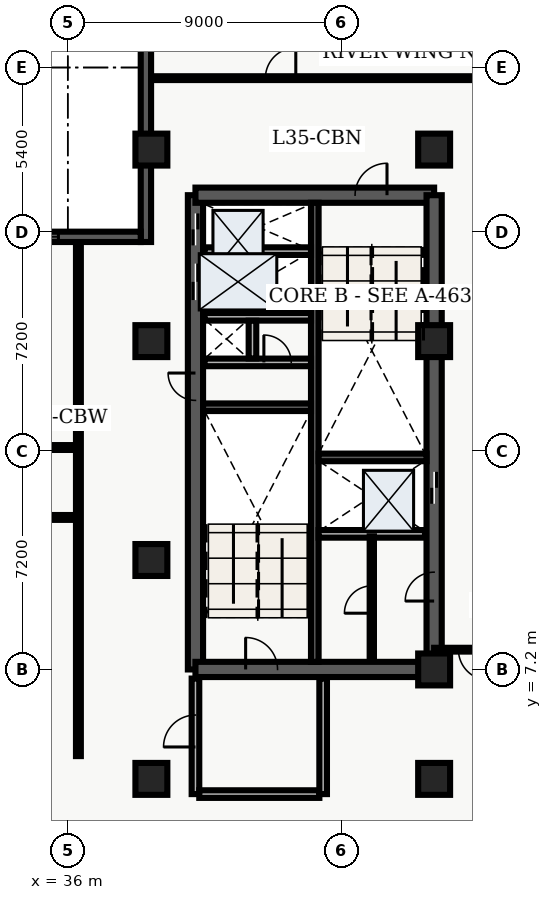
"""IFC4 building model, lengths in metres.
Left out: names, types, materials, properties, quantities, classifications, styles, units other than length and angle.
Written with IfcOpenShell. Run it as: python <this file> out.ifc"""

import sys

from ifc_helpers import new_model, entity, si_unit, converted_unit, direction, frame, origin_with_axes, origin_2d_with_axis, place, context, subcontext, project, spatial, polyline, rectangle, outline, extrude, element, fill, save


model = new_model("IFC4")
c1 = context("Model", 3, precision=1e-05, world=origin_with_axes(), true_north=direction((0.0, 1.0)))
c2 = subcontext(c1, "Body", "Model", "MODEL_VIEW")
j1 = project(units=[si_unit("LENGTHUNIT", "METRE"), converted_unit("PLANEANGLEUNIT", "DEGREE", entity("IfcPlaneAngleMeasure", 0.017), si_unit("PLANEANGLEUNIT", "RADIAN"), dimensions=[0, 0, 0, 0, 0, 0, 0])], contexts=[c1])
p1 = place(None, origin_with_axes())
s1 = spatial("IfcSite", under=j1, at=p1, CompositionType="ELEMENT")
p2 = place(p1, origin_with_axes())
s2 = spatial("IfcBuilding", under=s1, at=p2, CompositionType="ELEMENT")
p3 = place(p2, frame((0.0, 0.0, 144.6), z_axis=(0.0, 0.0, 1.0), x_axis=(1.0, 0.0, 0.0)))
s3 = spatial("IfcBuildingStorey", under=s2, at=p3, CompositionType="ELEMENT", Elevation=144.6)
p4 = place(p3, frame((40.2, 7.2, 0.0), z_axis=(0.0, 0.0, 1.0), x_axis=(0.0, 1.0, 0.0)))
e1 = element("IfcWall", 1, at=p4, inside=s3, PredefinedType="SHEAR", context=c2, shape_type="SweptSolid", body=[
    extrude(outline(polyline([(0.0, -0.25), (15.6, -0.25), (15.6, 0.25), (0.0, 0.25), (0.0, -0.25)])), origin_with_axes(), (0.0, 0.0, 1.0), 3.66),
])
p5 = place(p4, frame((14.475, 0.0, 0.0), z_axis=(0.0, 0.0, 1.0), x_axis=(1.0, 0.0, 0.0)))
e2 = element("IfcOpeningElement", 2, at=p5, cuts=e1, PredefinedType="OPENING", context=c2, shape_type="SweptSolid", body=[
    extrude(rectangle(XDim=1.05, YDim=0.52, at=origin_2d_with_axis()), origin_with_axes(), (0.0, 0.0, 1.0), 2.15),
])
p6 = place(p4, frame((12.75, 0.0, 0.0), z_axis=(0.0, 0.0, 1.0), x_axis=(1.0, 0.0, 0.0)))
e3 = element("IfcOpeningElement", 3, at=p6, cuts=e1, PredefinedType="OPENING", context=c2, shape_type="SweptSolid", body=[
    extrude(rectangle(XDim=1.2, YDim=0.52, at=origin_2d_with_axis()), origin_with_axes(), (0.0, 0.0, 1.0), 2.15),
])
p7 = place(p4, frame((9.3, 0.0, 0.0), z_axis=(0.0, 0.0, 1.0), x_axis=(1.0, 0.0, 0.0)))
e4 = element("IfcOpeningElement", 4, at=p7, cuts=e1, PredefinedType="OPENING", context=c2, shape_type="SweptSolid", body=[
    extrude(rectangle(XDim=0.9, YDim=0.52, at=origin_2d_with_axis()), origin_with_axes(), (0.0, 0.0, 1.0), 2.15),
])
p8 = place(p3, frame((40.2, 7.2, 0.0), z_axis=(0.0, 0.0, 1.0), x_axis=(1.0, 0.0, 0.0)))
e5 = element("IfcWall", 5, at=p8, inside=s3, PredefinedType="SHEAR", context=c2, shape_type="SweptSolid", body=[
    extrude(outline(polyline([(0.0, -0.25), (7.85, -0.25), (7.85, 0.25), (0.0, 0.25), (0.0, -0.25)])), origin_with_axes(), (0.0, 0.0, 1.0), 3.66),
])
p9 = place(p8, frame((2.175, 0.0, 0.0), z_axis=(0.0, 0.0, 1.0), x_axis=(1.0, 0.0, 0.0)))
e6 = element("IfcOpeningElement", 6, at=p9, cuts=e5, PredefinedType="OPENING", context=c2, shape_type="SweptSolid", body=[
    extrude(rectangle(XDim=1.05, YDim=0.52, at=origin_2d_with_axis()), origin_with_axes(), (0.0, 0.0, 1.0), 2.15),
])
p10 = place(p3, frame((40.2, 22.8, 0.0), z_axis=(0.0, 0.0, 1.0), x_axis=(1.0, 0.0, 0.0)))
e7 = element("IfcWall", 7, at=p10, inside=s3, PredefinedType="SHEAR", context=c2, shape_type="SweptSolid", body=[
    extrude(outline(polyline([(0.0, -0.25), (7.85, -0.25), (7.85, 0.25), (0.0, 0.25), (0.0, -0.25)])), origin_with_axes(), (0.0, 0.0, 1.0), 3.66),
])
p11 = place(p10, frame((5.775, 0.0, 0.0), z_axis=(0.0, 0.0, 1.0), x_axis=(1.0, 0.0, 0.0)))
e8 = element("IfcOpeningElement", 8, at=p11, cuts=e7, PredefinedType="OPENING", context=c2, shape_type="SweptSolid", body=[
    extrude(rectangle(XDim=1.05, YDim=0.52, at=origin_2d_with_axis()), origin_with_axes(), (0.0, 0.0, 1.0), 2.15),
])
p12 = place(p3, frame((48.05, 7.2, 0.0), z_axis=(0.0, 0.0, 1.0), x_axis=(0.0, 1.0, 0.0)))
e9 = element("IfcWall", 9, at=p12, inside=s3, PredefinedType="SHEAR", context=c2, shape_type="SweptSolid", body=[
    extrude(outline(polyline([(0.0, -0.25), (15.6, -0.25), (15.6, 0.25), (0.0, 0.25), (0.0, -0.25)])), origin_with_axes(), (0.0, 0.0, 1.0), 3.66),
])
p13 = place(p12, frame((5.975, 0.0, 0.0), z_axis=(0.0, 0.0, 1.0), x_axis=(1.0, 0.0, 0.0)))
e10 = element("IfcOpeningElement", 10, at=p13, cuts=e9, PredefinedType="OPENING", context=c2, shape_type="SweptSolid", body=[
    extrude(rectangle(XDim=1.05, YDim=0.52, at=origin_2d_with_axis()), origin_with_axes(), (0.0, 0.0, 1.0), 2.15),
])
p14 = place(p12, frame((2.725, 0.0, 0.0), z_axis=(0.0, 0.0, 1.0), x_axis=(1.0, 0.0, 0.0)))
e11 = element("IfcOpeningElement", 11, at=p14, cuts=e9, PredefinedType="OPENING", context=c2, shape_type="SweptSolid", body=[
    extrude(rectangle(XDim=0.95, YDim=0.52, at=origin_2d_with_axis()), origin_with_axes(), (0.0, 0.0, 1.0), 2.15),
])
p15 = place(p3, frame((44.125, 7.45, 0.0), z_axis=(0.0, 0.0, 1.0), x_axis=(0.0, 1.0, 0.0)))
e12 = element("IfcWall", 12, at=p15, inside=s3, PredefinedType="SHEAR", context=c2, shape_type="SweptSolid", body=[
    extrude(outline(polyline([(0.0, -0.125), (15.1, -0.125), (15.1, 0.125), (0.0, 0.125), (0.0, -0.125)])), origin_with_axes(), (0.0, 0.0, 1.0), 3.66),
])
for number, where, z_axis, x_axis in (
    (13, (40.45, 15.825, 0.0), (0.0, 0.0, 1.0), (1.0, 0.0, 0.0)),
    (14, (44.25, 14.175, 0.0), (0.0, 0.0, 1.0), (1.0, 0.0, 0.0)),
):
    element("IfcWall", number, at=place(p3, frame(where, z_axis=z_axis, x_axis=x_axis)), inside=s3, PredefinedType="SHEAR", context=c2, shape_type="SweptSolid", body=[
        extrude(outline(polyline([(0.0, -0.125), (3.55, -0.125), (3.55, 0.125), (0.0, 0.125), (0.0, -0.125)])), origin_with_axes(), (0.0, 0.0, 1.0), 3.66),
    ])
p16 = place(p3, frame((40.5, 17.3, 0.0), z_axis=(0.0, 0.0, 1.0), x_axis=(1.0, 0.0, 0.0)))
e15 = element("IfcWall", 15, at=p16, inside=s3, PredefinedType="SOLIDWALL", context=c2, shape_type="SweptSolid", body=[
    extrude(outline(polyline([(0.0, -0.125), (3.5, -0.125), (3.5, 0.125), (0.0, 0.125), (0.0, -0.125)])), origin_with_axes(), (0.0, 0.0, 1.0), 2.7),
])
p17 = place(p16, frame((2.4, 0.0, 0.0), z_axis=(0.0, 0.0, 1.0), x_axis=(1.0, 0.0, 0.0)))
e16 = element("IfcOpeningElement", 16, at=p17, cuts=e15, PredefinedType="OPENING", context=c2, shape_type="SweptSolid", body=[
    extrude(rectangle(XDim=0.9, YDim=0.27, at=origin_2d_with_axis()), origin_with_axes(), (0.0, 0.0, 1.0), 2.15),
])
p18 = place(p3, frame((40.5, 18.8, 0.0), z_axis=(0.0, 0.0, 1.0), x_axis=(1.0, 0.0, 0.0)))
e17 = element("IfcWall", 17, at=p18, inside=s3, PredefinedType="SOLIDWALL", context=c2, shape_type="SweptSolid", body=[
    extrude(outline(polyline([(0.0, -0.125), (3.5, -0.125), (3.5, 0.125), (0.0, 0.125), (0.0, -0.125)])), origin_with_axes(), (0.0, 0.0, 1.0), 2.7),
])
p19 = place(p3, frame((42.075, 17.43, 0.0), z_axis=(0.0, 0.0, 1.0), x_axis=(0.0, 1.0, 0.0)))
e18 = element("IfcWall", 18, at=p19, inside=s3, PredefinedType="SOLIDWALL", context=c2, shape_type="SweptSolid", body=[
    extrude(outline(polyline([(0.0, -0.125), (1.24, -0.125), (1.24, 0.125), (0.0, 0.125), (0.0, -0.125)])), origin_with_axes(), (0.0, 0.0, 1.0), 2.7),
])
p20 = place(p3, frame((40.2, 3.1, 0.0), z_axis=(0.0, 0.0, 1.0), x_axis=(0.0, 1.0, 0.0)))
e19 = element("IfcWall", 19, at=p20, inside=s3, PredefinedType="SOLIDWALL", context=c2, shape_type="SweptSolid", body=[
    extrude(outline(polyline([(0.0, -0.125), (3.8, -0.125), (3.8, 0.125), (0.0, 0.125), (0.0, -0.125)])), origin_with_axes(), (0.0, 0.0, 1.0), 2.7),
])
p21 = place(p20, frame((2.075, 0.0, 0.0), z_axis=(0.0, 0.0, 1.0), x_axis=(1.0, 0.0, 0.0)))
e20 = element("IfcOpeningElement", 20, at=p21, cuts=e19, PredefinedType="OPENING", context=c2, shape_type="SweptSolid", body=[
    extrude(rectangle(XDim=1.05, YDim=0.27, at=origin_2d_with_axis()), origin_with_axes(), (0.0, 0.0, 1.0), 2.15),
])
p22 = place(p3, frame((40.325, 3.1, 0.0), z_axis=(0.0, 0.0, 1.0), x_axis=(1.0, 0.0, 0.0)))
e21 = element("IfcWall", 21, at=p22, inside=s3, PredefinedType="SOLIDWALL", context=c2, shape_type="SweptSolid", body=[
    extrude(outline(polyline([(0.0, -0.125), (3.95, -0.125), (3.95, 0.125), (0.0, 0.125), (0.0, -0.125)])), origin_with_axes(), (0.0, 0.0, 1.0), 2.7),
])
p23 = place(p3, frame((44.4, 3.1, 0.0), z_axis=(0.0, 0.0, 1.0), x_axis=(0.0, 1.0, 0.0)))
e22 = element("IfcWall", 22, at=p23, inside=s3, PredefinedType="SOLIDWALL", context=c2, shape_type="SweptSolid", body=[
    extrude(outline(polyline([(0.0, -0.125), (3.8, -0.125), (3.8, 0.125), (0.0, 0.125), (0.0, -0.125)])), origin_with_axes(), (0.0, 0.0, 1.0), 2.7),
])
for number, where, z_axis, x_axis in (
    (23, (38.75, 3.6, 0.0), (0.0, 0.0, 1.0), (1.0, 0.0, 0.0)),
    (24, (38.75, 10.8, 0.0), (0.0, 0.0, 1.0), (1.0, 0.0, 0.0)),
    (25, (38.75, 18.0, 0.0), (0.0, 0.0, 1.0), (1.0, 0.0, 0.0)),
    (26, (38.75, 24.3, 0.0), (0.0, 0.0, 1.0), (1.0, 0.0, 0.0)),
    (27, (48.05, 3.6, 0.0), (0.0, 0.0, 1.0), (1.0, 0.0, 0.0)),
    (28, (48.05, 7.2, 0.0), (0.0, 0.0, 1.0), (1.0, 0.0, 0.0)),
    (29, (48.05, 18.0, 0.0), (0.0, 0.0, 1.0), (1.0, 0.0, 0.0)),
    (30, (48.05, 24.3, 0.0), (0.0, 0.0, 1.0), (1.0, 0.0, 0.0)),
):
    element("IfcColumn", number, at=place(p3, frame(where, z_axis=z_axis, x_axis=x_axis)), inside=s3, PredefinedType="COLUMN", context=c2, shape_type="SweptSolid", body=[
        extrude(rectangle(XDim=1.05, YDim=1.05, at=origin_2d_with_axis()), origin_with_axes(), (0.0, 0.0, 1.0), 3.9),
    ])
for number, where, z_axis, x_axis in (
    (31, (40.5, 20.96, 0.0), (0.0, 0.0, 1.0), (1.0, 0.0, 0.0)),
    (32, (44.25, 11.66, 0.0), (0.0, 0.0, 1.0), (1.0, 0.0, 0.0)),
):
    element("IfcWall", number, at=place(p3, frame(where, z_axis=z_axis, x_axis=x_axis)), inside=s3, PredefinedType="SOLIDWALL", context=c2, shape_type="SweptSolid", body=[
        extrude(outline(polyline([(0.0, -0.125), (3.5, -0.125), (3.5, 0.125), (0.0, 0.125), (0.0, -0.125)])), origin_with_axes(), (0.0, 0.0, 1.0), 2.7),
    ])
p24 = place(p3, frame((46.0, 7.5, 0.0), z_axis=(0.0, 0.0, 1.0), x_axis=(0.0, 1.0, 0.0)))
e33 = element("IfcWall", 33, at=p24, inside=s3, PredefinedType="PARTITIONING", context=c2, shape_type="SweptSolid", body=[
    extrude(outline(polyline([(0.0, -0.07), (4.08, -0.07), (4.08, 0.07), (0.0, 0.07), (0.0, -0.07)])), origin_with_axes(), (0.0, 0.0, 1.0), 2.7),
])
p25 = place(p24, frame((2.0, 0.0, 0.0), z_axis=(0.0, 0.0, 1.0), x_axis=(1.0, 0.0, 0.0)))
e34 = element("IfcOpeningElement", 34, at=p25, cuts=e33, PredefinedType="OPENING", context=c2, shape_type="SweptSolid", body=[
    extrude(rectangle(XDim=0.9, YDim=0.16, at=origin_2d_with_axis()), origin_with_axes(), (0.0, 0.0, 1.0), 2.15),
])
p26 = place(p3, frame((21.15, 12.2, 0.0), z_axis=(0.0, 0.0, 1.0), x_axis=(1.0, 0.0, 0.0)))
e35 = element("IfcWall", 35, at=p26, inside=s3, PredefinedType="PARTITIONING", context=c2, shape_type="SweptSolid", body=[
    extrude(outline(polyline([(0.0, -0.08), (15.2, -0.08), (15.2, 0.08), (0.0, 0.08), (0.0, -0.08)])), origin_with_axes(), (0.0, 0.0, 1.0), 2.7),
])
p27 = place(p26, frame((3.315, 0.0, 0.0), z_axis=(0.0, 0.0, 1.0), x_axis=(1.0, 0.0, 0.0)))
e36 = element("IfcOpeningElement", 36, at=p27, cuts=e35, PredefinedType="OPENING", context=c2, shape_type="SweptSolid", body=[
    extrude(rectangle(XDim=1.0, YDim=0.18, at=origin_2d_with_axis()), origin_with_axes(), (0.0, 0.0, 1.0), 2.15),
])
p28 = place(p26, frame((7.624, 0.0, 0.0), z_axis=(0.0, 0.0, 1.0), x_axis=(1.0, 0.0, 0.0)))
e37 = element("IfcOpeningElement", 37, at=p28, cuts=e35, PredefinedType="OPENING", context=c2, shape_type="SweptSolid", body=[
    extrude(rectangle(XDim=1.0, YDim=0.18, at=origin_2d_with_axis()), origin_with_axes(), (0.0, 0.0, 1.0), 2.15),
])
p29 = place(p26, frame((10.288, 0.0, 0.0), z_axis=(0.0, 0.0, 1.0), x_axis=(1.0, 0.0, 0.0)))
e38 = element("IfcOpeningElement", 38, at=p29, cuts=e35, PredefinedType="OPENING", context=c2, shape_type="SweptSolid", body=[
    extrude(rectangle(XDim=1.0, YDim=0.18, at=origin_2d_with_axis()), origin_with_axes(), (0.0, 0.0, 1.0), 2.15),
])
p30 = place(p26, frame((13.169, 0.0, 0.0), z_axis=(0.0, 0.0, 1.0), x_axis=(1.0, 0.0, 0.0)))
e39 = element("IfcOpeningElement", 39, at=p30, cuts=e35, PredefinedType="OPENING", context=c2, shape_type="SweptSolid", body=[
    extrude(rectangle(XDim=1.0, YDim=0.18, at=origin_2d_with_axis()), origin_with_axes(), (0.0, 0.0, 1.0), 2.15),
])
p31 = place(p3, frame((21.15, 14.5, 0.0), z_axis=(0.0, 0.0, 1.0), x_axis=(1.0, 0.0, 0.0)))
e40 = element("IfcWall", 40, at=p31, inside=s3, PredefinedType="PARTITIONING", context=c2, shape_type="SweptSolid", body=[
    extrude(outline(polyline([(0.0, -0.08), (15.2, -0.08), (15.2, 0.08), (0.0, 0.08), (0.0, -0.08)])), origin_with_axes(), (0.0, 0.0, 1.0), 2.7),
])
p32 = place(p31, frame((7.65, 0.0, 0.0), z_axis=(0.0, 0.0, 1.0), x_axis=(1.0, 0.0, 0.0)))
e41 = element("IfcOpeningElement", 41, at=p32, cuts=e40, PredefinedType="OPENING", context=c2, shape_type="SweptSolid", body=[
    extrude(rectangle(XDim=1.2, YDim=0.18, at=origin_2d_with_axis()), origin_with_axes(), (0.0, 0.0, 1.0), 2.2),
])
p33 = place(p3, frame((36.35, 4.35, 0.0), z_axis=(0.0, 0.0, 1.0), x_axis=(0.0, 1.0, 0.0)))
e42 = element("IfcWall", 42, at=p33, inside=s3, PredefinedType="PARTITIONING", context=c2, shape_type="SweptSolid", body=[
    extrude(outline(polyline([(0.0, -0.08), (16.95, -0.08), (16.95, 0.08), (0.0, 0.08), (0.0, -0.08)])), origin_with_axes(), (0.0, 0.0, 1.0), 2.7),
])
p34 = place(p3, frame((59.665, 7.85, 0.0), z_axis=(0.0, 0.0, 1.0), x_axis=(-1.0, 0.0, 0.0)))
e43 = element("IfcWall", 43, at=p34, inside=s3, PredefinedType="PARTITIONING", context=c2, shape_type="SweptSolid", body=[
    extrude(outline(polyline([(0.0, -0.062), (11.615, -0.062), (11.615, 0.062), (0.0, 0.062), (0.0, -0.062)])), origin_with_axes(), (0.0, 0.0, 1.0), 2.7),
])
p35 = place(p34, frame((10.315, 0.0, 0.0), z_axis=(0.0, 0.0, 1.0), x_axis=(1.0, 0.0, 0.0)))
e44 = element("IfcOpeningElement", 44, at=p35, cuts=e43, PredefinedType="OPENING", context=c2, shape_type="SweptSolid", body=[
    extrude(rectangle(XDim=1.0, YDim=0.145, at=origin_2d_with_axis()), origin_with_axes(), (0.0, 0.0, 1.0), 2.15),
])
p36 = place(p3, frame((38.735, 26.65, 0.0), z_axis=(0.0, 0.0, 1.0), x_axis=(1.0, 0.0, 0.0)))
e45 = element("IfcWall", 45, at=p36, inside=s3, PredefinedType="PARTITIONING", context=c2, shape_type="SweptSolid", body=[
    extrude(outline(polyline([(0.0, -0.062), (20.905, -0.062), (20.905, 0.062), (0.0, 0.062), (0.0, -0.062)])), origin_with_axes(), (0.0, 0.0, 1.0), 2.7),
])
p37 = place(p36, frame((4.265, 0.0, 0.0), z_axis=(0.0, 0.0, 1.0), x_axis=(1.0, 0.0, 0.0)))
e46 = element("IfcOpeningElement", 46, at=p37, cuts=e45, PredefinedType="OPENING", context=c2, shape_type="SweptSolid", body=[
    extrude(rectangle(XDim=1.0, YDim=0.145, at=origin_2d_with_axis()), origin_with_axes(), (0.0, 0.0, 1.0), 2.15),
])
p38 = place(p3, frame((38.57, 21.26, 0.0), z_axis=(0.0, 0.0, 1.0), x_axis=(0.0, 1.0, 0.0)))
e47 = element("IfcWall", 47, at=p38, inside=s3, PredefinedType="SOLIDWALL", context=c2, shape_type="SweptSolid", body=[
    extrude(outline(polyline([(0.0, -0.17), (7.54, -0.17), (7.54, 0.17), (0.0, 0.17), (0.0, -0.17)])), origin_with_axes(), (0.0, 0.0, 1.0), 3.66),
])
p39 = place(p3, frame((21.855, 21.43, 0.0), z_axis=(0.0, 0.0, 1.0), x_axis=(1.0, 0.0, 0.0)))
e48 = element("IfcWall", 48, at=p39, inside=s3, PredefinedType="SOLIDWALL", context=c2, shape_type="SweptSolid", body=[
    extrude(outline(polyline([(0.0, -0.17), (16.545, -0.17), (16.545, 0.17), (0.0, 0.17), (0.0, -0.17)])), origin_with_axes(), (0.0, 0.0, 1.0), 3.66),
])
p40 = place(p39, frame((3.157, 0.0, 0.45), z_axis=(0.0, 0.0, 1.0), x_axis=(1.0, 0.0, 0.0)))
e49 = element("IfcOpeningElement", 49, at=p40, cuts=e48, PredefinedType="OPENING", context=c2, shape_type="SweptSolid", body=[
    extrude(rectangle(XDim=1.8, YDim=0.36, at=origin_2d_with_axis()), origin_with_axes(), (0.0, 0.0, 1.0), 2.1),
])
p41 = place(p39, frame((8.272, 0.0, 0.45), z_axis=(0.0, 0.0, 1.0), x_axis=(1.0, 0.0, 0.0)))
e50 = element("IfcOpeningElement", 50, at=p41, cuts=e48, PredefinedType="OPENING", context=c2, shape_type="SweptSolid", body=[
    extrude(rectangle(XDim=1.8, YDim=0.36, at=origin_2d_with_axis()), origin_with_axes(), (0.0, 0.0, 1.0), 2.1),
])
p42 = place(p39, frame((12.937, 0.0, 0.45), z_axis=(0.0, 0.0, 1.0), x_axis=(1.0, 0.0, 0.0)))
e51 = element("IfcOpeningElement", 51, at=p42, cuts=e48, PredefinedType="OPENING", context=c2, shape_type="SweptSolid", body=[
    extrude(rectangle(XDim=1.8, YDim=0.36, at=origin_2d_with_axis()), origin_with_axes(), (0.0, 0.0, 1.0), 2.1),
])
p43 = place(p12, frame((5.975, 0.0, 0.0), z_axis=(0.0, 0.0, 1.0), x_axis=(1.0, 0.0, 0.0)))
e52 = element("IfcDoor", 52, at=p43, inside=s3, OperationType="SLIDING_TO_LEFT", PredefinedType="DOOR", context=c2, shape_type="SweptSolid", body=[
    extrude(rectangle(XDim=1.05, YDim=0.09, at=origin_2d_with_axis()), origin_with_axes(), (0.0, 0.0, 1.0), 2.15),
])
fill(e10, e52)
p44 = place(p4, frame((14.475, 0.0, 0.0), z_axis=(0.0, 0.0, 1.0), x_axis=(1.0, 0.0, 0.0)))
e53 = element("IfcDoor", 53, at=p44, inside=s3, OperationType="SLIDING_TO_RIGHT", PredefinedType="DOOR", context=c2, shape_type="SweptSolid", body=[
    extrude(rectangle(XDim=1.05, YDim=0.09, at=origin_2d_with_axis()), origin_with_axes(), (0.0, 0.0, 1.0), 2.15),
])
fill(e2, e53)
p45 = place(p4, frame((12.75, 0.0, 0.0), z_axis=(0.0, 0.0, 1.0), x_axis=(1.0, 0.0, 0.0)))
e54 = element("IfcDoor", 54, at=p45, inside=s3, OperationType="DOUBLE_DOOR_SLIDING", PredefinedType="DOOR", context=c2, shape_type="SweptSolid", body=[
    extrude(rectangle(XDim=1.2, YDim=0.09, at=origin_2d_with_axis()), origin_with_axes(), (0.0, 0.0, 1.0), 2.15),
])
fill(e3, e54)
p46 = place(p4, frame((9.3, 0.0, 0.0), z_axis=(0.0, 0.0, 1.0), x_axis=(1.0, 0.0, 0.0)))
e55 = element("IfcDoor", 55, at=p46, inside=s3, OperationType="SINGLE_SWING_RIGHT", PredefinedType="DOOR", context=c2, shape_type="SweptSolid", body=[
    extrude(rectangle(XDim=0.9, YDim=0.09, at=origin_2d_with_axis()), origin_with_axes(), (0.0, 0.0, 1.0), 2.15),
])
fill(e4, e55)
p47 = place(p16, frame((2.4, 0.0, 0.0), z_axis=(0.0, 0.0, 1.0), x_axis=(1.0, 0.0, 0.0)))
e56 = element("IfcDoor", 56, at=p47, inside=s3, OperationType="SINGLE_SWING_LEFT", PredefinedType="DOOR", context=c2, shape_type="SweptSolid", body=[
    extrude(rectangle(XDim=0.9, YDim=0.09, at=origin_2d_with_axis()), origin_with_axes(), (0.0, 0.0, 1.0), 2.15),
])
fill(e16, e56)
p48 = place(p8, frame((2.175, 0.0, 0.0), z_axis=(0.0, 0.0, 1.0), x_axis=(1.0, 0.0, 0.0)))
e57 = element("IfcDoor", 57, at=p48, inside=s3, OperationType="SINGLE_SWING_LEFT", PredefinedType="DOOR", context=c2, shape_type="SweptSolid", body=[
    extrude(rectangle(XDim=1.05, YDim=0.09, at=origin_2d_with_axis()), origin_with_axes(), (0.0, 0.0, 1.0), 2.15),
])
fill(e6, e57)
p49 = place(p10, frame((5.775, 0.0, 0.0), z_axis=(0.0, 0.0, 1.0), x_axis=(1.0, 0.0, 0.0)))
e58 = element("IfcDoor", 58, at=p49, inside=s3, OperationType="SINGLE_SWING_RIGHT", PredefinedType="DOOR", context=c2, shape_type="SweptSolid", body=[
    extrude(rectangle(XDim=1.05, YDim=0.09, at=origin_2d_with_axis()), origin_with_axes(), (0.0, 0.0, 1.0), 2.15),
])
fill(e8, e58)
p50 = place(p20, frame((2.075, 0.0, 0.0), z_axis=(0.0, 0.0, 1.0), x_axis=(1.0, 0.0, 0.0)))
e59 = element("IfcDoor", 59, at=p50, inside=s3, OperationType="SINGLE_SWING_LEFT", PredefinedType="DOOR", context=c2, shape_type="SweptSolid", body=[
    extrude(rectangle(XDim=1.05, YDim=0.09, at=origin_2d_with_axis()), origin_with_axes(), (0.0, 0.0, 1.0), 2.15),
])
fill(e20, e59)
p51 = place(p24, frame((2.0, 0.0, 0.0), z_axis=(0.0, 0.0, 1.0), x_axis=(1.0, 0.0, 0.0)))
e60 = element("IfcDoor", 60, at=p51, inside=s3, OperationType="SINGLE_SWING_LEFT", PredefinedType="DOOR", context=c2, shape_type="SweptSolid", body=[
    extrude(rectangle(XDim=0.9, YDim=0.084, at=origin_2d_with_axis()), origin_with_axes(), (0.0, 0.0, 1.0), 2.15),
])
fill(e34, e60)
p52 = place(p12, frame((2.725, 0.0, 0.0), z_axis=(0.0, 0.0, 1.0), x_axis=(1.0, 0.0, 0.0)))
e61 = element("IfcDoor", 61, at=p52, inside=s3, OperationType="SINGLE_SWING_LEFT", PredefinedType="DOOR", context=c2, shape_type="SweptSolid", body=[
    extrude(rectangle(XDim=0.95, YDim=0.09, at=origin_2d_with_axis()), origin_with_axes(), (0.0, 0.0, 1.0), 2.15),
])
fill(e11, e61)
p53 = place(p34, frame((10.315, 0.0, 0.0), z_axis=(0.0, 0.0, 1.0), x_axis=(1.0, 0.0, 0.0)))
e62 = element("IfcDoor", 62, at=p53, inside=s3, OperationType="SINGLE_SWING_LEFT", PredefinedType="DOOR", context=c2, shape_type="SweptSolid", body=[
    extrude(rectangle(XDim=1.0, YDim=0.075, at=origin_2d_with_axis()), origin_with_axes(), (0.0, 0.0, 1.0), 2.15),
])
fill(e44, e62)
p54 = place(p36, frame((4.265, 0.0, 0.0), z_axis=(0.0, 0.0, 1.0), x_axis=(1.0, 0.0, 0.0)))
e63 = element("IfcDoor", 63, at=p54, inside=s3, OperationType="SINGLE_SWING_RIGHT", PredefinedType="DOOR", context=c2, shape_type="SweptSolid", body=[
    extrude(rectangle(XDim=1.0, YDim=0.075, at=origin_2d_with_axis()), origin_with_axes(), (0.0, 0.0, 1.0), 2.15),
])
fill(e46, e63)
p55 = place(p39, frame((12.937, 0.0, 0.45), z_axis=(0.0, 0.0, 1.0), x_axis=(1.0, 0.0, 0.0)))
e64 = element("IfcWindow", 64, at=p55, inside=s3, PredefinedType="WINDOW", context=c2, shape_type="SweptSolid", body=[
    extrude(rectangle(XDim=1.8, YDim=0.09, at=origin_2d_with_axis()), origin_with_axes(), (0.0, 0.0, 1.0), 2.1),
])
fill(e51, e64)
save(model, sys.argv[1])
